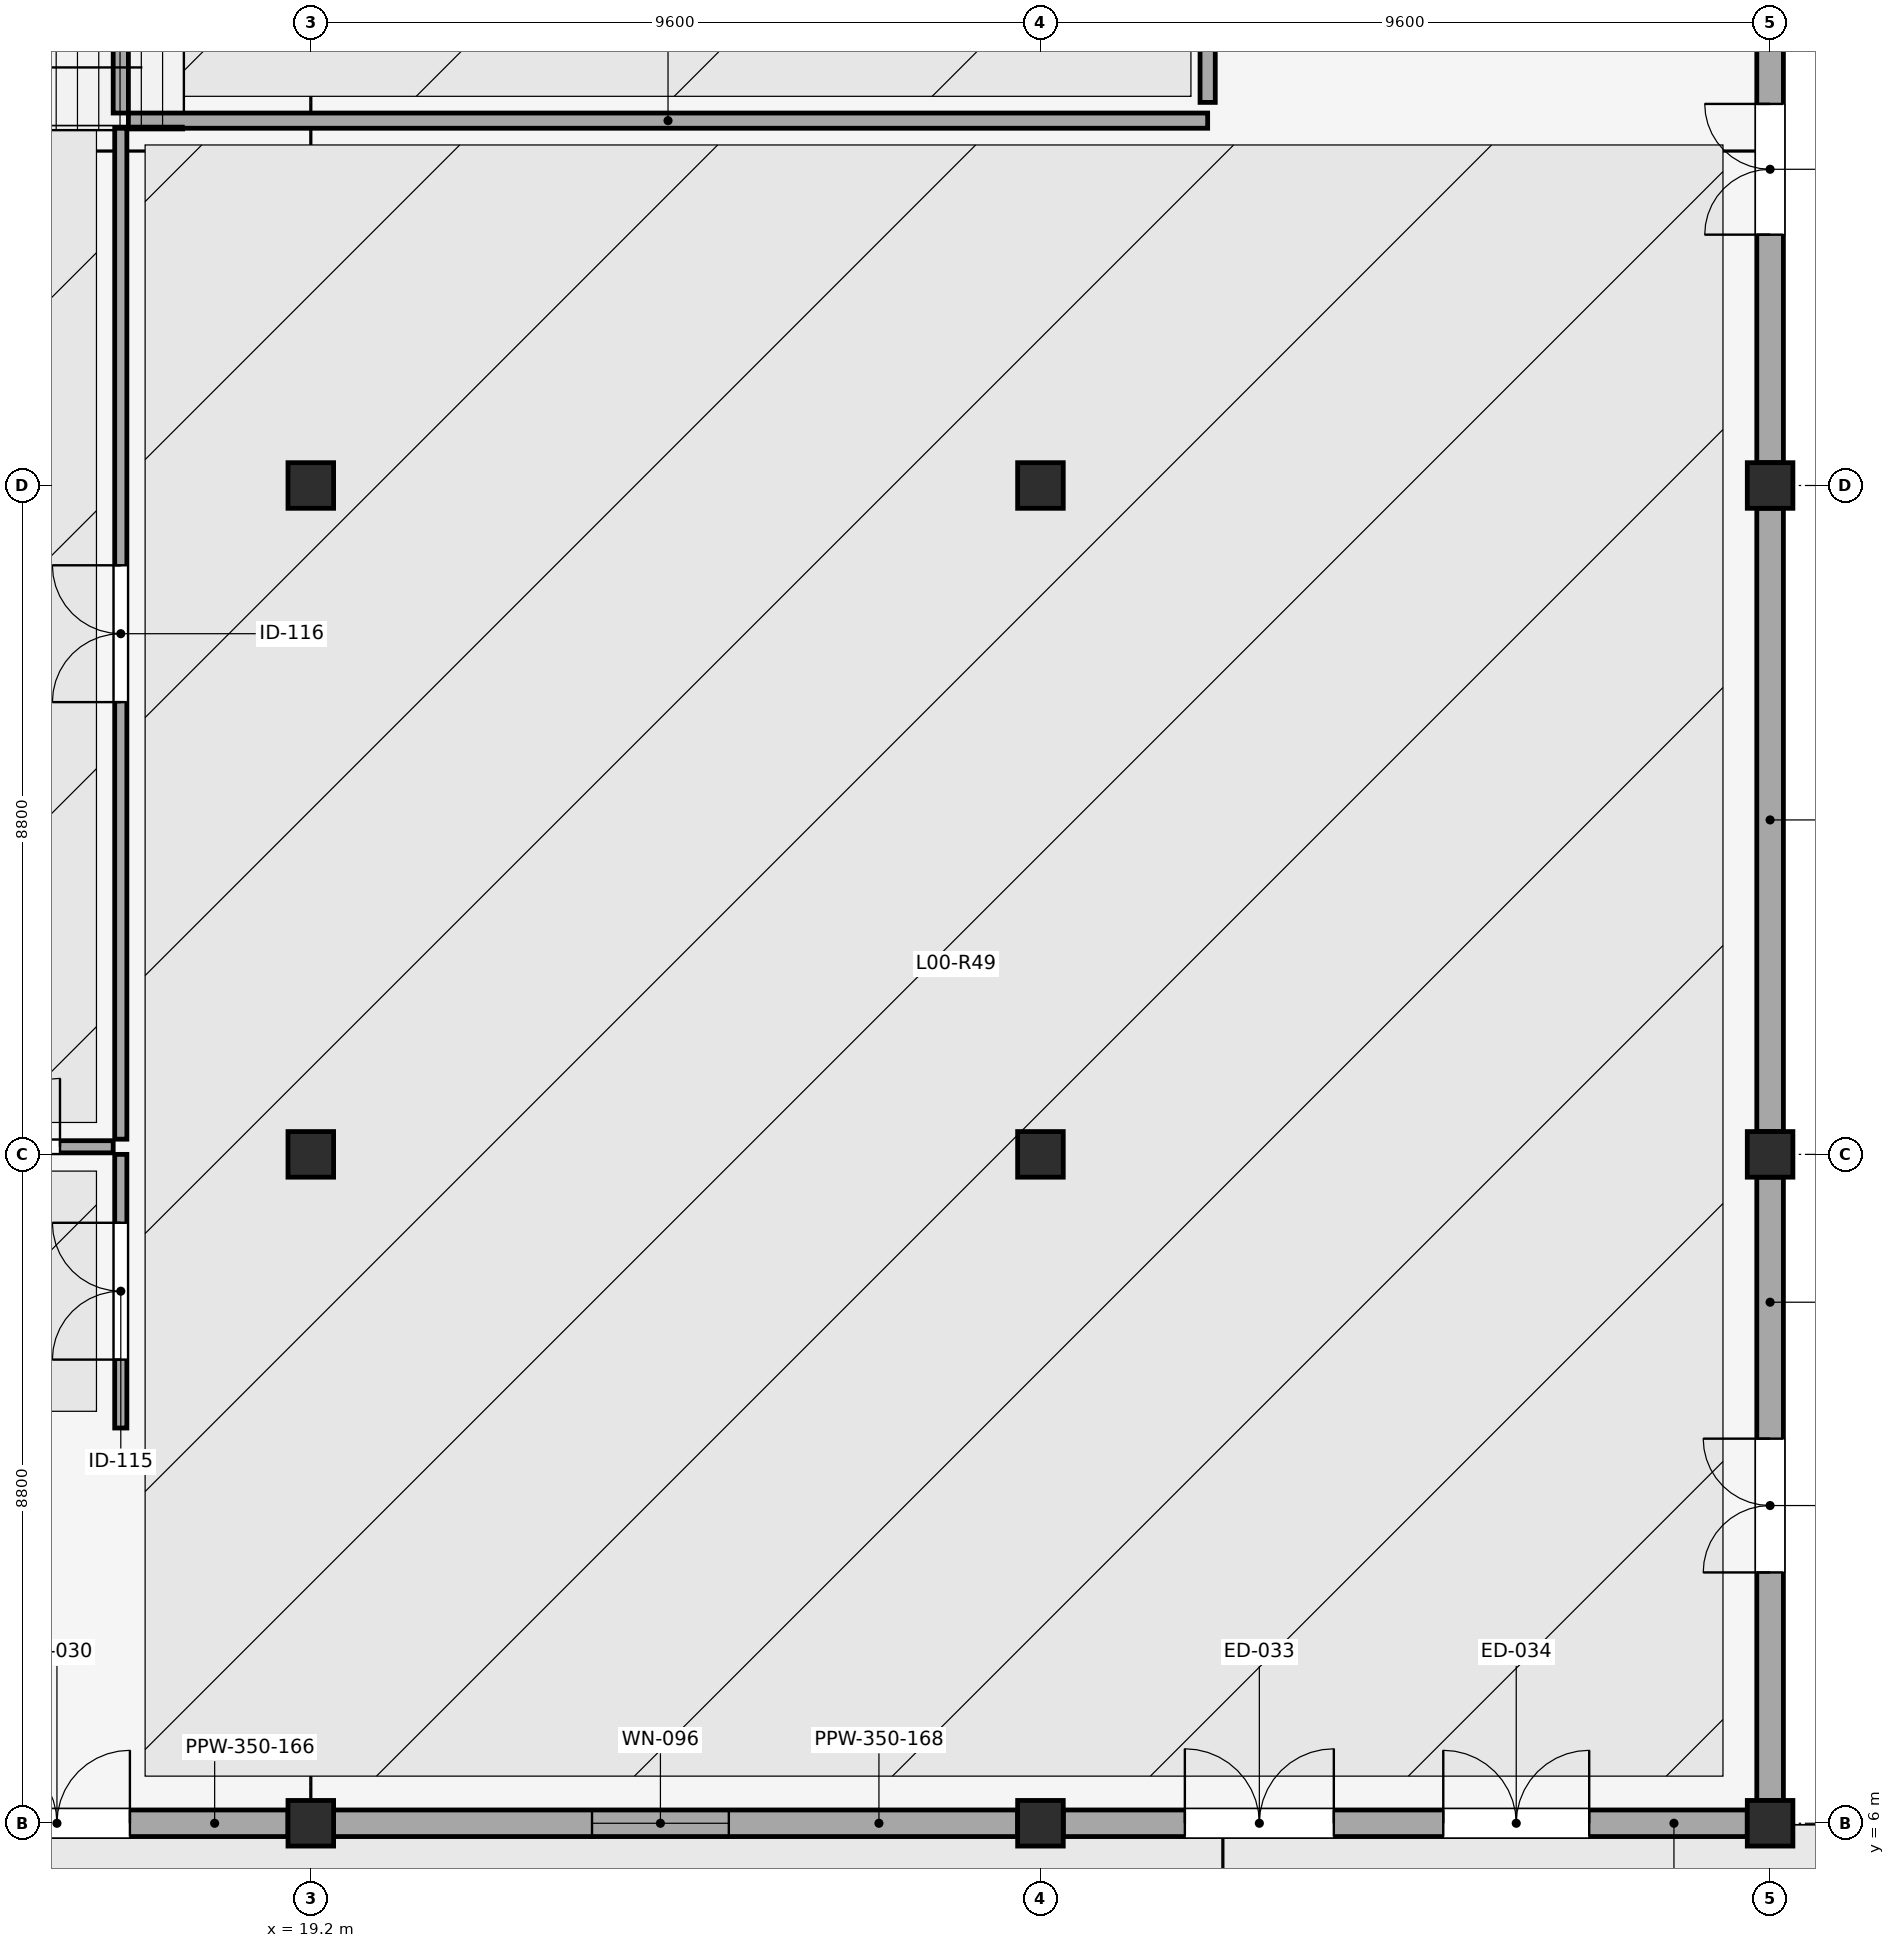
"""IFC4 building model, lengths in metres.
Left out: names, types, materials, properties, quantities, classifications, styles, units other than length and angle.
Written with IfcOpenShell. Run it as: python <this file> out.ifc"""

import sys

from ifc_helpers import new_model, si_unit, direction, frame, frame_2d, origin, origin_2d, place, context, subcontext, project, spatial, rectangle, extrude, element, fill, save


model = new_model("IFC4")
c1 = context("Model", 3, precision=1e-05, world=origin(), true_north=direction((0.0, 1.0)))
c2 = subcontext(c1, "Body", "Model", "MODEL_VIEW")
j1 = project(units=[si_unit("LENGTHUNIT", "METRE"), si_unit("PLANEANGLEUNIT", "RADIAN")], contexts=[c1])
p1 = place(None, origin())
s1 = spatial("IfcSite", under=j1, at=p1, CompositionType="ELEMENT")
p2 = place(p1, origin())
s2 = spatial("IfcBuilding", under=s1, at=p2, CompositionType="ELEMENT")
p3 = place(p2, origin())
s3 = spatial("IfcBuildingStorey", under=s2, at=p3, CompositionType="ELEMENT", Elevation=0.0)
for number, where, z_axis, x_axis in (
    (1, (19.2, 6.0, 0.0), (0.0, 0.0, 1.0), (1.0, 0.0, 0.0)),
    (2, (19.2, 14.8, 0.0), (0.0, 0.0, 1.0), (1.0, 0.0, 0.0)),
    (3, (19.2, 23.6, 0.0), (0.0, 0.0, 1.0), (1.0, 0.0, 0.0)),
    (4, (28.8, 6.0, 0.0), (0.0, 0.0, 1.0), (1.0, 0.0, 0.0)),
    (5, (28.8, 14.8, 0.0), (0.0, 0.0, 1.0), (1.0, 0.0, 0.0)),
    (6, (28.8, 23.6, 0.0), (0.0, 0.0, 1.0), (1.0, 0.0, 0.0)),
    (7, (38.4, 6.0, 0.0), (0.0, 0.0, 1.0), (1.0, 0.0, 0.0)),
    (8, (38.4, 14.8, 0.0), (0.0, 0.0, 1.0), (1.0, 0.0, 0.0)),
    (9, (38.4, 23.6, 0.0), (0.0, 0.0, 1.0), (1.0, 0.0, 0.0)),
):
    element("IfcColumn", number, at=place(p3, frame(where, z_axis=z_axis, x_axis=x_axis)), inside=s3, PredefinedType="COLUMN", context=c2, shape_type="SweptSolid", body=[
        extrude(rectangle(XDim=0.6, YDim=0.6, at=origin_2d()), origin(), (0.0, 0.0, 1.0), 4.8),
    ])
p4 = place(p3, frame((9.9, 6.0, 0.0), z_axis=(0.0, 0.0, 1.0), x_axis=(1.0, 0.0, 0.0)))
e10 = element("IfcWall", 10, at=p4, inside=s3, PredefinedType="SOLIDWALL", context=c2, shape_type="SweptSolid", body=[
    extrude(rectangle(XDim=9.0, YDim=0.35, at=frame_2d((4.5, 0.0))), origin(), (0.0, 0.0, 1.0), 4.1),
])
p5 = place(p4, frame((1.6, 0.0, 0.0)))
e11 = element("IfcOpeningElement", 11, at=p5, cuts=e10, PredefinedType="OPENING", context=c2, shape_type="SweptSolid", body=[
    extrude(rectangle(XDim=1.96, YDim=2.37, at=frame_2d((0.98, 1.185))), frame((0.0, 0.185, 0.0), z_axis=(0.0, -1.0, 0.0), x_axis=(1.0, 0.0, 0.0)), (0.0, 0.0, 1.0), 0.37),
])
p6 = place(p4, frame((5.0, 0.0, 0.0)))
e12 = element("IfcOpeningElement", 12, at=p6, cuts=e10, PredefinedType="OPENING", context=c2, shape_type="SweptSolid", body=[
    extrude(rectangle(XDim=1.92, YDim=2.34, at=frame_2d((0.96, 1.17))), frame((0.0, 0.185, 0.0), z_axis=(0.0, -1.0, 0.0), x_axis=(1.0, 0.0, 0.0)), (0.0, 0.0, 1.0), 0.37),
])
p7 = place(p3, frame((19.5, 6.0, 0.0), z_axis=(0.0, 0.0, 1.0), x_axis=(1.0, 0.0, 0.0)))
e13 = element("IfcWall", 13, at=p7, inside=s3, PredefinedType="SOLIDWALL", context=c2, shape_type="SweptSolid", body=[
    extrude(rectangle(XDim=9.0, YDim=0.35, at=frame_2d((4.5, 0.0))), origin(), (0.0, 0.0, 1.0), 4.1),
])
p8 = place(p7, frame((3.4, 0.0, 1.0)))
e14 = element("IfcOpeningElement", 14, at=p8, cuts=e13, PredefinedType="OPENING", context=c2, shape_type="SweptSolid", body=[
    extrude(rectangle(XDim=1.8, YDim=1.8, at=frame_2d((0.9, 0.9))), frame((0.0, 0.185, 0.0), z_axis=(0.0, -1.0, 0.0), x_axis=(1.0, 0.0, 0.0)), (0.0, 0.0, 1.0), 0.37),
])
p9 = place(p3, frame((29.1, 6.0, 0.0), z_axis=(0.0, 0.0, 1.0), x_axis=(1.0, 0.0, 0.0)))
e15 = element("IfcWall", 15, at=p9, inside=s3, PredefinedType="SOLIDWALL", context=c2, shape_type="SweptSolid", body=[
    extrude(rectangle(XDim=9.0, YDim=0.35, at=frame_2d((4.5, 0.0))), origin(), (0.0, 0.0, 1.0), 4.1),
])
p10 = place(p9, frame((1.6, 0.0, 0.0)))
e16 = element("IfcOpeningElement", 16, at=p10, cuts=e15, PredefinedType="OPENING", context=c2, shape_type="SweptSolid", body=[
    extrude(rectangle(XDim=1.96, YDim=2.37, at=frame_2d((0.98, 1.185))), frame((0.0, 0.185, 0.0), z_axis=(0.0, -1.0, 0.0), x_axis=(1.0, 0.0, 0.0)), (0.0, 0.0, 1.0), 0.37),
])
p11 = place(p9, frame((5.0, 0.0, 0.0)))
e17 = element("IfcOpeningElement", 17, at=p11, cuts=e15, PredefinedType="OPENING", context=c2, shape_type="SweptSolid", body=[
    extrude(rectangle(XDim=1.92, YDim=2.34, at=frame_2d((0.96, 1.17))), frame((0.0, 0.185, 0.0), z_axis=(0.0, -1.0, 0.0), x_axis=(1.0, 0.0, 0.0)), (0.0, 0.0, 1.0), 0.37),
])
p12 = place(p3, frame((38.4, 6.3, 0.0), z_axis=(0.0, 0.0, 1.0), x_axis=(0.0, 1.0, 0.0)))
e18 = element("IfcWall", 18, at=p12, inside=s3, PredefinedType="SOLIDWALL", context=c2, shape_type="SweptSolid", body=[
    extrude(rectangle(XDim=8.2, YDim=0.35, at=frame_2d((4.1, 0.0))), origin(), (0.0, 0.0, 1.0), 4.1),
])
p13 = place(p12, frame((3.0, 0.0, 0.0)))
e19 = element("IfcOpeningElement", 19, at=p13, cuts=e18, PredefinedType="OPENING", context=c2, shape_type="SweptSolid", body=[
    extrude(rectangle(XDim=1.76, YDim=2.37, at=frame_2d((0.88, 1.185))), frame((0.0, 0.185, 0.0), z_axis=(0.0, -1.0, 0.0), x_axis=(1.0, 0.0, 0.0)), (0.0, 0.0, 1.0), 0.37),
])
p14 = place(p3, frame((38.4, 15.1, 0.0), z_axis=(0.0, 0.0, 1.0), x_axis=(0.0, 1.0, 0.0)))
e20 = element("IfcWall", 20, at=p14, inside=s3, PredefinedType="SOLIDWALL", context=c2, shape_type="SweptSolid", body=[
    extrude(rectangle(XDim=8.2, YDim=0.35, at=frame_2d((4.1, 0.0))), origin(), (0.0, 0.0, 1.0), 4.1),
])
p15 = place(p3, frame((38.4, 23.9, 0.0), z_axis=(0.0, 0.0, 1.0), x_axis=(0.0, 1.0, 0.0)))
e21 = element("IfcWall", 21, at=p15, inside=s3, PredefinedType="SOLIDWALL", context=c2, shape_type="SweptSolid", body=[
    extrude(rectangle(XDim=8.2, YDim=0.35, at=frame_2d((4.1, 0.0))), origin(), (0.0, 0.0, 1.0), 4.1),
])
p16 = place(p15, frame((3.0, 0.0, 0.0)))
e22 = element("IfcOpeningElement", 22, at=p16, cuts=e21, PredefinedType="OPENING", context=c2, shape_type="SweptSolid", body=[
    extrude(rectangle(XDim=1.72, YDim=2.34, at=frame_2d((0.86, 1.17))), frame((0.0, 0.185, 0.0), z_axis=(0.0, -1.0, 0.0), x_axis=(1.0, 0.0, 0.0)), (0.0, 0.0, 1.0), 0.37),
])
p17 = place(p3, frame((16.8, 28.4, 0.0), z_axis=(0.0, 0.0, 1.0), x_axis=(1.0, 0.0, 0.0)))
e23 = element("IfcWall", 23, at=p17, inside=s3, PredefinedType="PARTITIONING", context=c2, shape_type="SweptSolid", body=[
    extrude(rectangle(XDim=14.2, YDim=0.2, at=frame_2d((7.1, 0.0))), origin(), (0.0, 0.0, 1.0), 4.42),
])
p18 = place(p3, frame((16.7, 11.2, 0.0), z_axis=(0.0, 0.0, 1.0), x_axis=(0.0, 1.0, 0.0)))
e24 = element("IfcWall", 24, at=p18, inside=s3, PredefinedType="PARTITIONING", context=c2, shape_type="SweptSolid", body=[
    extrude(rectangle(XDim=3.6, YDim=0.16, at=frame_2d((1.8, 0.0))), origin(), (0.0, 0.0, 1.0), 4.42),
])
p19 = place(p18, frame((0.9, 0.0, 0.0)))
e25 = element("IfcOpeningElement", 25, at=p19, cuts=e24, PredefinedType="OPENING", context=c2, shape_type="SweptSolid", body=[
    extrude(rectangle(XDim=1.8, YDim=2.15, at=frame_2d((0.9, 1.075))), frame((0.0, 0.09, 0.0), z_axis=(0.0, -1.0, 0.0), x_axis=(1.0, 0.0, 0.0)), (0.0, 0.0, 1.0), 0.18),
])
p20 = place(p3, frame((16.7, 15.0, 0.0), z_axis=(0.0, 0.0, 1.0), x_axis=(0.0, 1.0, 0.0)))
e26 = element("IfcWall", 26, at=p20, inside=s3, PredefinedType="PARTITIONING", context=c2, shape_type="SweptSolid", body=[
    extrude(rectangle(XDim=13.3, YDim=0.16, at=frame_2d((6.65, 0.0))), origin(), (0.0, 0.0, 1.0), 4.42),
])
p21 = place(p20, frame((5.75, 0.0, 0.0)))
e27 = element("IfcOpeningElement", 27, at=p21, cuts=e26, PredefinedType="OPENING", context=c2, shape_type="SweptSolid", body=[
    extrude(rectangle(XDim=1.8, YDim=2.15, at=frame_2d((0.9, 1.075))), frame((0.0, 0.09, 0.0), z_axis=(0.0, -1.0, 0.0), x_axis=(1.0, 0.0, 0.0)), (0.0, 0.0, 1.0), 0.18),
])
p22 = place(p3, frame((16.7, 28.5, 0.0), z_axis=(0.0, 0.0, 1.0), x_axis=(0.0, 1.0, 0.0)))
e28 = element("IfcWall", 28, at=p22, inside=s3, PredefinedType="PARTITIONING", context=c2, shape_type="SweptSolid", body=[
    extrude(rectangle(XDim=17.3, YDim=0.2, at=frame_2d((8.65, 0.0))), origin(), (0.0, 0.0, 1.0), 4.42),
])
p23 = place(p22, frame((7.85, 0.0, 0.0)))
e29 = element("IfcOpeningElement", 29, at=p23, cuts=e28, PredefinedType="OPENING", context=c2, shape_type="SweptSolid", body=[
    extrude(rectangle(XDim=1.6, YDim=2.15, at=frame_2d((0.8, 1.075))), frame((0.0, 0.11, 0.0), z_axis=(0.0, -1.0, 0.0), x_axis=(1.0, 0.0, 0.0)), (0.0, 0.0, 1.0), 0.22),
])
p24 = place(p3, frame((13.4, 14.9, 0.0), z_axis=(0.0, 0.0, 1.0), x_axis=(1.0, 0.0, 0.0)))
e30 = element("IfcWall", 30, at=p24, inside=s3, PredefinedType="PARTITIONING", context=c2, shape_type="SweptSolid", body=[
    extrude(rectangle(XDim=3.2, YDim=0.16, at=frame_2d((1.6, 0.0))), origin(), (0.0, 0.0, 1.0), 3.895),
])
p25 = place(p24, frame((0.7, 0.0, 0.0)))
e31 = element("IfcOpeningElement", 31, at=p25, cuts=e30, PredefinedType="OPENING", context=c2, shape_type="SweptSolid", body=[
    extrude(rectangle(XDim=1.8, YDim=2.15, at=frame_2d((0.9, 1.075))), frame((0.0, 0.09, 0.0), z_axis=(0.0, -1.0, 0.0), x_axis=(1.0, 0.0, 0.0)), (0.0, 0.0, 1.0), 0.18),
])
p26 = place(p3, frame((31.0, 28.64, 0.0), z_axis=(0.0, 0.0, 1.0), x_axis=(0.0, 1.0, 0.0)))
e32 = element("IfcWall", 32, at=p26, inside=s3, PredefinedType="PARTITIONING", context=c2, shape_type="SweptSolid", body=[
    extrude(rectangle(XDim=12.495, YDim=0.2, at=frame_2d((6.248, 0.0))), origin(), (0.0, 0.0, 1.0), 4.42),
])
p27 = place(p6, origin())
e33 = element("IfcDoor", 33, at=p27, inside=s3, OperationType="DOUBLE_DOOR_SINGLE_SWING", PredefinedType="DOOR", context=c2, shape_type="SweptSolid", body=[
    extrude(rectangle(XDim=1.92, YDim=2.34, at=frame_2d((0.96, 1.17))), frame((0.0, 0.025, 0.0), z_axis=(0.0, -1.0, 0.0), x_axis=(1.0, 0.0, 0.0)), (0.0, 0.0, 1.0), 0.05),
])
fill(e12, e33)
p28 = place(p8, origin())
e34 = element("IfcWindow", 34, at=p28, inside=s3, PartitioningType="SINGLE_PANEL", PredefinedType="WINDOW", context=c2, shape_type="SweptSolid", body=[
    extrude(rectangle(XDim=1.8, YDim=1.8, at=frame_2d((0.9, 0.9))), frame((0.0, 0.03, 0.0), z_axis=(0.0, -1.0, 0.0), x_axis=(1.0, 0.0, 0.0)), (0.0, 0.0, 1.0), 0.06),
])
fill(e14, e34)
p29 = place(p10, origin())
e35 = element("IfcDoor", 35, at=p29, inside=s3, OperationType="DOUBLE_DOOR_SINGLE_SWING", PredefinedType="DOOR", context=c2, shape_type="SweptSolid", body=[
    extrude(rectangle(XDim=1.96, YDim=2.37, at=frame_2d((0.98, 1.185))), frame((0.0, 0.025, 0.0), z_axis=(0.0, -1.0, 0.0), x_axis=(1.0, 0.0, 0.0)), (0.0, 0.0, 1.0), 0.05),
])
fill(e16, e35)
p30 = place(p11, origin())
e36 = element("IfcDoor", 36, at=p30, inside=s3, OperationType="DOUBLE_DOOR_SINGLE_SWING", PredefinedType="DOOR", context=c2, shape_type="SweptSolid", body=[
    extrude(rectangle(XDim=1.92, YDim=2.34, at=frame_2d((0.96, 1.17))), frame((0.0, 0.025, 0.0), z_axis=(0.0, -1.0, 0.0), x_axis=(1.0, 0.0, 0.0)), (0.0, 0.0, 1.0), 0.05),
])
fill(e17, e36)
p31 = place(p13, origin())
e37 = element("IfcDoor", 37, at=p31, inside=s3, OperationType="DOUBLE_DOOR_SINGLE_SWING", PredefinedType="DOOR", context=c2, shape_type="SweptSolid", body=[
    extrude(rectangle(XDim=1.76, YDim=2.37, at=frame_2d((0.88, 1.185))), frame((0.0, 0.025, 0.0), z_axis=(0.0, -1.0, 0.0), x_axis=(1.0, 0.0, 0.0)), (0.0, 0.0, 1.0), 0.05),
])
fill(e19, e37)
p32 = place(p16, origin())
e38 = element("IfcDoor", 38, at=p32, inside=s3, OperationType="DOUBLE_DOOR_SINGLE_SWING", PredefinedType="DOOR", context=c2, shape_type="SweptSolid", body=[
    extrude(rectangle(XDim=1.72, YDim=2.34, at=frame_2d((0.86, 1.17))), frame((0.0, 0.025, 0.0), z_axis=(0.0, -1.0, 0.0), x_axis=(1.0, 0.0, 0.0)), (0.0, 0.0, 1.0), 0.05),
])
fill(e22, e38)
p33 = place(p19, origin())
e39 = element("IfcDoor", 39, at=p33, inside=s3, OperationType="DOUBLE_DOOR_SINGLE_SWING", PredefinedType="DOOR", context=c2, shape_type="SweptSolid", body=[
    extrude(rectangle(XDim=1.8, YDim=2.15, at=frame_2d((0.9, 1.075))), frame((0.0, 0.025, 0.0), z_axis=(0.0, -1.0, 0.0), x_axis=(1.0, 0.0, 0.0)), (0.0, 0.0, 1.0), 0.05),
])
fill(e25, e39)
p34 = place(p21, origin())
e40 = element("IfcDoor", 40, at=p34, inside=s3, OperationType="DOUBLE_DOOR_SINGLE_SWING", PredefinedType="DOOR", context=c2, shape_type="SweptSolid", body=[
    extrude(rectangle(XDim=1.8, YDim=2.15, at=frame_2d((0.9, 1.075))), frame((0.0, 0.025, 0.0), z_axis=(0.0, -1.0, 0.0), x_axis=(1.0, 0.0, 0.0)), (0.0, 0.0, 1.0), 0.05),
])
fill(e27, e40)
p35 = place(p25, origin())
e41 = element("IfcDoor", 41, at=p35, inside=s3, OperationType="DOUBLE_DOOR_SINGLE_SWING", PredefinedType="DOOR", context=c2, shape_type="SweptSolid", body=[
    extrude(rectangle(XDim=1.8, YDim=2.15, at=frame_2d((0.9, 1.075))), frame((0.0, 0.025, 0.0), z_axis=(0.0, -1.0, 0.0), x_axis=(1.0, 0.0, 0.0)), (0.0, 0.0, 1.0), 0.05),
])
fill(e31, e41)
save(model, sys.argv[1])
